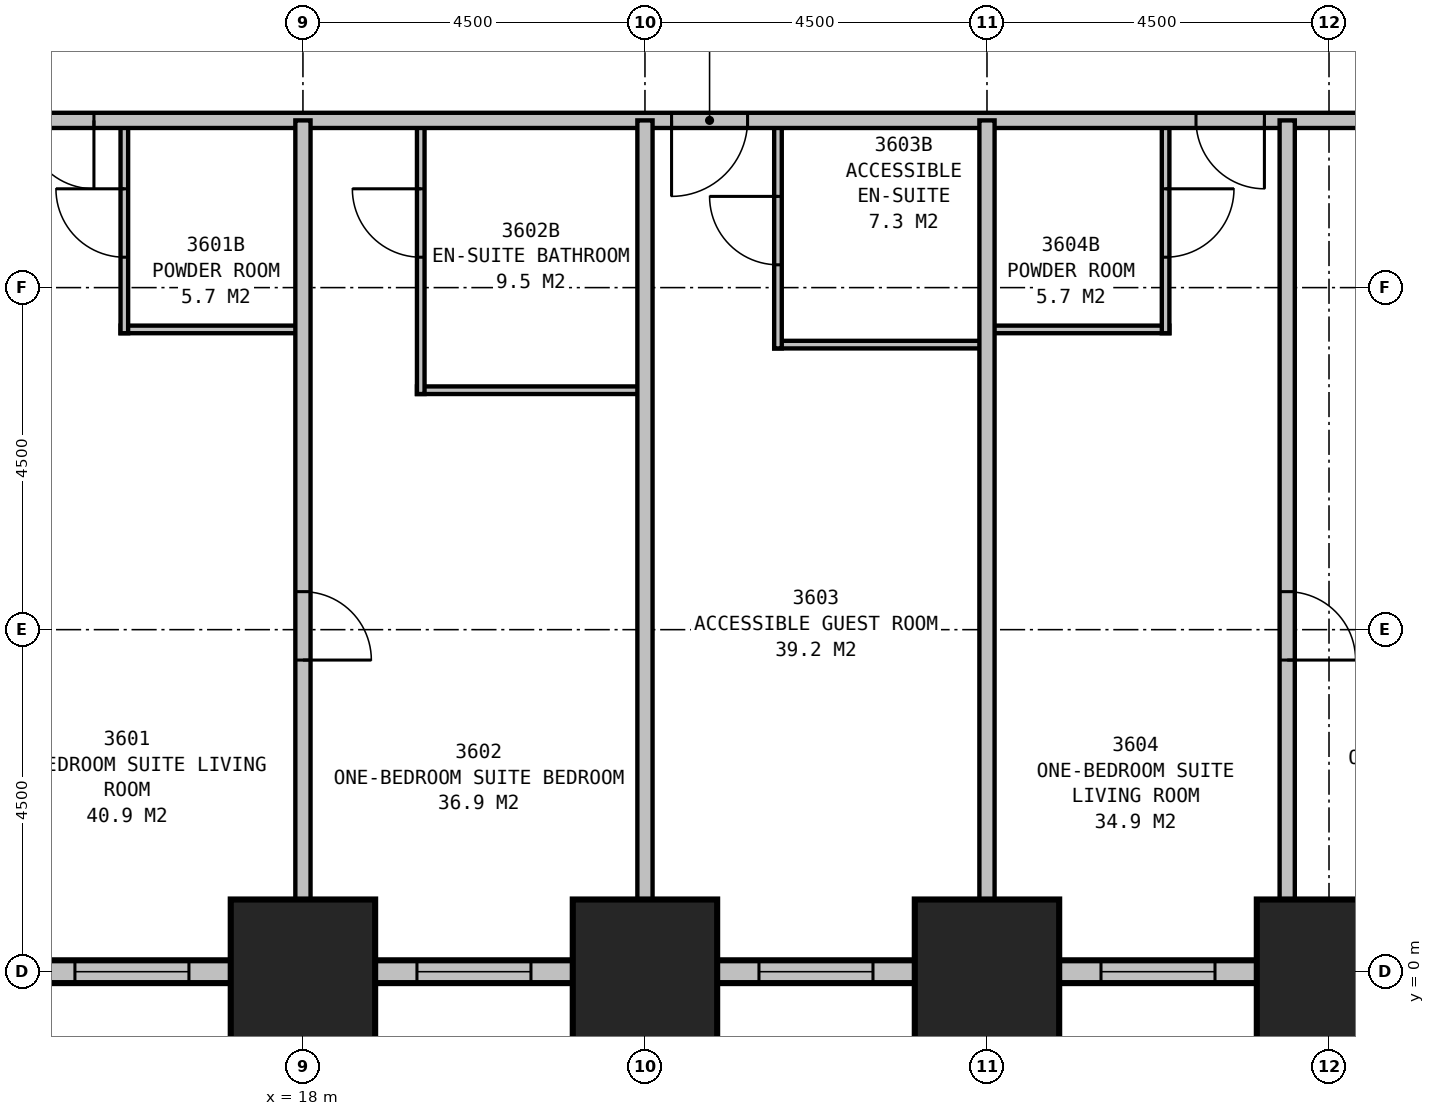
"""IFC4 building model, lengths in metres.
Left out: names, types, materials, properties, quantities, classifications, styles, units other than length and angle.
Written with IfcOpenShell. Run it as: python <this file> out.ifc"""

import sys

from ifc_helpers import new_model, si_unit, direction, frame, frame_2d, origin, origin_2d, place, context, subcontext, project, spatial, rectangle, extrude, element, fill, save


model = new_model("IFC4")
c1 = context("Model", 3, precision=1e-05, world=origin(), true_north=direction((0.0, 1.0)))
c2 = subcontext(c1, "Body", "Model", "MODEL_VIEW")
j1 = project(units=[si_unit("LENGTHUNIT", "METRE"), si_unit("PLANEANGLEUNIT", "RADIAN")], contexts=[c1])
p1 = place(None, origin())
s1 = spatial("IfcSite", under=j1, at=p1, CompositionType="ELEMENT")
p2 = place(p1, origin())
s2 = spatial("IfcBuilding", under=s1, at=p2, CompositionType="ELEMENT")
p3 = place(p2, frame((0.0, 0.0, 138.9)))
s3 = spatial("IfcBuildingStorey", under=s2, at=p3, CompositionType="ELEMENT", Elevation=138.9)
for number, where, z_axis, x_axis in (
    (1, (18.0, 0.0, 0.0), (0.0, 0.0, 1.0), (1.0, 0.0, 0.0)),
    (2, (22.5, 0.0, 0.0), (0.0, 0.0, 1.0), (1.0, 0.0, 0.0)),
    (3, (27.0, 0.0, 0.0), (0.0, 0.0, 1.0), (1.0, 0.0, 0.0)),
    (4, (31.5, 0.0, 0.0), (0.0, 0.0, 1.0), (1.0, 0.0, 0.0)),
):
    element("IfcColumn", number, at=place(p3, frame(where, z_axis=z_axis, x_axis=x_axis)), inside=s3, PredefinedType="COLUMN", context=c2, shape_type="SweptSolid", body=[
        extrude(rectangle(XDim=1.9, YDim=1.9, at=origin_2d()), origin(), (0.0, 0.0, 1.0), 3.5),
    ])
p4 = place(p3, frame((4.35, 0.0, 0.0), z_axis=(0.0, 0.0, 1.0), x_axis=(1.0, 0.0, 0.0)))
e5 = element("IfcWall", 5, at=p4, inside=s3, PredefinedType="STANDARD", context=c2, shape_type="SweptSolid", body=[
    extrude(rectangle(XDim=40.8, YDim=0.3, at=frame_2d((20.4, 0.0))), origin(), (0.0, 0.0, 1.0), 2.15),
])
p5 = place(p4, frame((1.65, 0.0, 0.5)))
e6 = element("IfcOpeningElement", 6, at=p5, cuts=e5, PredefinedType="OPENING", context=c2, shape_type="SweptSolid", body=[
    extrude(rectangle(XDim=1.5, YDim=1.5, at=frame_2d((0.75, 0.75))), frame((0.0, 0.16, 0.0), z_axis=(0.0, -1.0, 0.0), x_axis=(1.0, 0.0, 0.0)), (0.0, 0.0, 1.0), 0.32),
])
p6 = place(p4, frame((6.15, 0.0, 0.5)))
e7 = element("IfcOpeningElement", 7, at=p6, cuts=e5, PredefinedType="OPENING", context=c2, shape_type="SweptSolid", body=[
    extrude(rectangle(XDim=1.5, YDim=1.5, at=frame_2d((0.75, 0.75))), frame((0.0, 0.16, 0.0), z_axis=(0.0, -1.0, 0.0), x_axis=(1.0, 0.0, 0.0)), (0.0, 0.0, 1.0), 0.32),
])
p7 = place(p4, frame((10.65, 0.0, 0.5)))
e8 = element("IfcOpeningElement", 8, at=p7, cuts=e5, PredefinedType="OPENING", context=c2, shape_type="SweptSolid", body=[
    extrude(rectangle(XDim=1.5, YDim=1.5, at=frame_2d((0.75, 0.75))), frame((0.0, 0.16, 0.0), z_axis=(0.0, -1.0, 0.0), x_axis=(1.0, 0.0, 0.0)), (0.0, 0.0, 1.0), 0.32),
])
p8 = place(p4, frame((15.15, 0.0, 0.5)))
e9 = element("IfcOpeningElement", 9, at=p8, cuts=e5, PredefinedType="OPENING", context=c2, shape_type="SweptSolid", body=[
    extrude(rectangle(XDim=1.5, YDim=1.5, at=frame_2d((0.75, 0.75))), frame((0.0, 0.16, 0.0), z_axis=(0.0, -1.0, 0.0), x_axis=(1.0, 0.0, 0.0)), (0.0, 0.0, 1.0), 0.32),
])
p9 = place(p4, frame((19.65, 0.0, 0.5)))
e10 = element("IfcOpeningElement", 10, at=p9, cuts=e5, PredefinedType="OPENING", context=c2, shape_type="SweptSolid", body=[
    extrude(rectangle(XDim=1.5, YDim=1.5, at=frame_2d((0.75, 0.75))), frame((0.0, 0.16, 0.0), z_axis=(0.0, -1.0, 0.0), x_axis=(1.0, 0.0, 0.0)), (0.0, 0.0, 1.0), 0.32),
])
p10 = place(p4, frame((24.15, 0.0, 0.5)))
e11 = element("IfcOpeningElement", 11, at=p10, cuts=e5, PredefinedType="OPENING", context=c2, shape_type="SweptSolid", body=[
    extrude(rectangle(XDim=1.5, YDim=1.5, at=frame_2d((0.75, 0.75))), frame((0.0, 0.16, 0.0), z_axis=(0.0, -1.0, 0.0), x_axis=(1.0, 0.0, 0.0)), (0.0, 0.0, 1.0), 0.32),
])
p11 = place(p4, frame((28.65, 0.0, 0.5)))
e12 = element("IfcOpeningElement", 12, at=p11, cuts=e5, PredefinedType="OPENING", context=c2, shape_type="SweptSolid", body=[
    extrude(rectangle(XDim=1.5, YDim=1.5, at=frame_2d((0.75, 0.75))), frame((0.0, 0.16, 0.0), z_axis=(0.0, -1.0, 0.0), x_axis=(1.0, 0.0, 0.0)), (0.0, 0.0, 1.0), 0.32),
])
p12 = place(p4, frame((33.15, 0.0, 0.5)))
e13 = element("IfcOpeningElement", 13, at=p12, cuts=e5, PredefinedType="OPENING", context=c2, shape_type="SweptSolid", body=[
    extrude(rectangle(XDim=1.5, YDim=1.5, at=frame_2d((0.75, 0.75))), frame((0.0, 0.16, 0.0), z_axis=(0.0, -1.0, 0.0), x_axis=(1.0, 0.0, 0.0)), (0.0, 0.0, 1.0), 0.32),
])
p13 = place(p4, frame((37.65, 0.0, 0.5)))
e14 = element("IfcOpeningElement", 14, at=p13, cuts=e5, PredefinedType="OPENING", context=c2, shape_type="SweptSolid", body=[
    extrude(rectangle(XDim=1.5, YDim=1.5, at=frame_2d((0.75, 0.75))), frame((0.0, 0.16, 0.0), z_axis=(0.0, -1.0, 0.0), x_axis=(1.0, 0.0, 0.0)), (0.0, 0.0, 1.0), 0.32),
])
p14 = place(p3, frame((11.2, 11.2, 0.0), z_axis=(0.0, 0.0, 1.0), x_axis=(1.0, 0.0, 0.0)))
e15 = element("IfcWall", 15, at=p14, inside=s3, PredefinedType="PARTITIONING", context=c2, shape_type="SweptSolid", body=[
    extrude(rectangle(XDim=27.1, YDim=0.2, at=frame_2d((13.55, 0.0))), origin(), (0.0, 0.0, 1.0), 3.25),
])
p15 = place(p14, frame((4.05, 0.0, 0.0), z_axis=(0.0, 0.0, 1.0), x_axis=(-1.0, 0.0, 0.0)))
e16 = element("IfcOpeningElement", 16, at=p15, cuts=e15, PredefinedType="OPENING", context=c2, shape_type="SweptSolid", body=[
    extrude(rectangle(XDim=0.9, YDim=2.1, at=frame_2d((0.45, 1.05))), frame((0.0, 0.11, 0.0), z_axis=(0.0, -1.0, 0.0), x_axis=(1.0, 0.0, 0.0)), (0.0, 0.0, 1.0), 0.22),
])
p16 = place(p14, frame((12.65, 0.0, 0.0), z_axis=(0.0, 0.0, 1.0), x_axis=(-1.0, 0.0, 0.0)))
e17 = element("IfcOpeningElement", 17, at=p16, cuts=e15, PredefinedType="OPENING", context=c2, shape_type="SweptSolid", body=[
    extrude(rectangle(XDim=1.0, YDim=2.1, at=frame_2d((0.5, 1.05))), frame((0.0, 0.11, 0.0), z_axis=(0.0, -1.0, 0.0), x_axis=(1.0, 0.0, 0.0)), (0.0, 0.0, 1.0), 0.22),
])
p17 = place(p14, frame((19.45, 0.0, 0.0), z_axis=(0.0, 0.0, 1.0), x_axis=(-1.0, 0.0, 0.0)))
e18 = element("IfcOpeningElement", 18, at=p17, cuts=e15, PredefinedType="OPENING", context=c2, shape_type="SweptSolid", body=[
    extrude(rectangle(XDim=0.9, YDim=2.1, at=frame_2d((0.45, 1.05))), frame((0.0, 0.11, 0.0), z_axis=(0.0, -1.0, 0.0), x_axis=(1.0, 0.0, 0.0)), (0.0, 0.0, 1.0), 0.22),
])
p18 = place(p14, frame((1.6, 0.0, 0.0), z_axis=(0.0, 0.0, 1.0), x_axis=(-1.0, 0.0, 0.0)))
e19 = element("IfcOpeningElement", 19, at=p18, cuts=e15, PredefinedType="OPENING", context=c2, shape_type="SweptSolid", body=[
    extrude(rectangle(XDim=0.9, YDim=2.1, at=frame_2d((0.45, 1.05))), frame((0.0, 0.11, 0.0), z_axis=(0.0, -1.0, 0.0), x_axis=(1.0, 0.0, 0.0)), (0.0, 0.0, 1.0), 0.22),
])
p19 = place(p14, frame((26.4, 0.0, 0.0), z_axis=(0.0, 0.0, 1.0), x_axis=(-1.0, 0.0, 0.0)))
e20 = element("IfcOpeningElement", 20, at=p19, cuts=e15, PredefinedType="OPENING", context=c2, shape_type="SweptSolid", body=[
    extrude(rectangle(XDim=0.9, YDim=2.1, at=frame_2d((0.45, 1.05))), frame((0.0, 0.11, 0.0), z_axis=(0.0, -1.0, 0.0), x_axis=(1.0, 0.0, 0.0)), (0.0, 0.0, 1.0), 0.22),
])
p20 = place(p3, frame((18.0, 11.2, 0.0), z_axis=(0.0, 0.0, 1.0), x_axis=(0.0, -1.0, 0.0)))
e21 = element("IfcWall", 21, at=p20, inside=s3, PredefinedType="PARTITIONING", context=c2, shape_type="SweptSolid", body=[
    extrude(rectangle(XDim=11.2, YDim=0.2, at=frame_2d((5.6, 0.0))), origin(), (0.0, 0.0, 1.0), 2.25),
])
p21 = place(p20, frame((6.2, 0.0, 0.0)))
e22 = element("IfcOpeningElement", 22, at=p21, cuts=e21, PredefinedType="OPENING", context=c2, shape_type="SweptSolid", body=[
    extrude(rectangle(XDim=0.9, YDim=2.1, at=frame_2d((0.45, 1.05))), frame((0.0, 0.11, 0.0), z_axis=(0.0, -1.0, 0.0), x_axis=(1.0, 0.0, 0.0)), (0.0, 0.0, 1.0), 0.22),
])
for number, where, z_axis, x_axis in (
    (23, (22.5, 11.2, 0.0), (0.0, 0.0, 1.0), (0.0, -1.0, 0.0)),
    (24, (27.0, 11.2, 0.0), (0.0, 0.0, 1.0), (0.0, -1.0, 0.0)),
):
    element("IfcWall", number, at=place(p3, frame(where, z_axis=z_axis, x_axis=x_axis)), inside=s3, PredefinedType="PARTITIONING", context=c2, shape_type="SweptSolid", body=[
        extrude(rectangle(XDim=11.2, YDim=0.2, at=frame_2d((5.6, 0.0))), origin(), (0.0, 0.0, 1.0), 2.25),
    ])
p22 = place(p3, frame((30.95, 11.2, 0.0), z_axis=(0.0, 0.0, 1.0), x_axis=(0.0, -1.0, 0.0)))
e25 = element("IfcWall", 25, at=p22, inside=s3, PredefinedType="PARTITIONING", context=c2, shape_type="SweptSolid", body=[
    extrude(rectangle(XDim=11.2, YDim=0.2, at=frame_2d((5.6, 0.0))), origin(), (0.0, 0.0, 1.0), 2.25),
])
p23 = place(p22, frame((6.2, 0.0, 0.0)))
e26 = element("IfcOpeningElement", 26, at=p23, cuts=e25, PredefinedType="OPENING", context=c2, shape_type="SweptSolid", body=[
    extrude(rectangle(XDim=0.9, YDim=2.1, at=frame_2d((0.45, 1.05))), frame((0.0, 0.11, 0.0), z_axis=(0.0, -1.0, 0.0), x_axis=(1.0, 0.0, 0.0)), (0.0, 0.0, 1.0), 0.22),
])
p24 = place(p3, frame((15.6, 8.45, 0.0), z_axis=(0.0, 0.0, 1.0), x_axis=(1.0, 0.0, 0.0)))
e27 = element("IfcWall", 27, at=p24, inside=s3, PredefinedType="PLUMBINGWALL", context=c2, shape_type="SweptSolid", body=[
    extrude(rectangle(XDim=2.4, YDim=0.1, at=frame_2d((1.2, 0.0))), origin(), (0.0, 0.0, 1.0), 3.25),
])
p25 = place(p3, frame((15.65, 11.2, 0.0), z_axis=(0.0, 0.0, 1.0), x_axis=(0.0, -1.0, 0.0)))
e28 = element("IfcWall", 28, at=p25, inside=s3, PredefinedType="PLUMBINGWALL", context=c2, shape_type="SweptSolid", body=[
    extrude(rectangle(XDim=2.8, YDim=0.1, at=frame_2d((1.4, 0.0))), origin(), (0.0, 0.0, 1.0), 3.25),
])
p26 = place(p25, frame((1.8, 0.0, 0.0), z_axis=(0.0, 0.0, 1.0), x_axis=(-1.0, 0.0, 0.0)))
e29 = element("IfcOpeningElement", 29, at=p26, cuts=e28, PredefinedType="OPENING", context=c2, shape_type="SweptSolid", body=[
    extrude(rectangle(XDim=0.9, YDim=2.1, at=frame_2d((0.45, 1.05))), frame((0.0, 0.06, 0.0), z_axis=(0.0, -1.0, 0.0), x_axis=(1.0, 0.0, 0.0)), (0.0, 0.0, 1.0), 0.12),
])
p27 = place(p3, frame((19.5, 7.65, 0.0), z_axis=(0.0, 0.0, 1.0), x_axis=(1.0, 0.0, 0.0)))
e30 = element("IfcWall", 30, at=p27, inside=s3, PredefinedType="PLUMBINGWALL", context=c2, shape_type="SweptSolid", body=[
    extrude(rectangle(XDim=3.0, YDim=0.1, at=frame_2d((1.5, 0.0))), origin(), (0.0, 0.0, 1.0), 3.25),
])
p28 = place(p3, frame((19.55, 11.2, 0.0), z_axis=(0.0, 0.0, 1.0), x_axis=(0.0, -1.0, 0.0)))
e31 = element("IfcWall", 31, at=p28, inside=s3, PredefinedType="PLUMBINGWALL", context=c2, shape_type="SweptSolid", body=[
    extrude(rectangle(XDim=3.6, YDim=0.1, at=frame_2d((1.8, 0.0))), origin(), (0.0, 0.0, 1.0), 3.25),
])
p29 = place(p28, frame((1.8, 0.0, 0.0), z_axis=(0.0, 0.0, 1.0), x_axis=(-1.0, 0.0, 0.0)))
e32 = element("IfcOpeningElement", 32, at=p29, cuts=e31, PredefinedType="OPENING", context=c2, shape_type="SweptSolid", body=[
    extrude(rectangle(XDim=0.9, YDim=2.1, at=frame_2d((0.45, 1.05))), frame((0.0, 0.06, 0.0), z_axis=(0.0, -1.0, 0.0), x_axis=(1.0, 0.0, 0.0)), (0.0, 0.0, 1.0), 0.12),
])
p30 = place(p3, frame((24.2, 8.25, 0.0), z_axis=(0.0, 0.0, 1.0), x_axis=(1.0, 0.0, 0.0)))
e33 = element("IfcWall", 33, at=p30, inside=s3, PredefinedType="PLUMBINGWALL", context=c2, shape_type="SweptSolid", body=[
    extrude(rectangle(XDim=2.8, YDim=0.1, at=frame_2d((1.4, 0.0))), origin(), (0.0, 0.0, 1.0), 3.25),
])
p31 = place(p3, frame((24.25, 11.2, 0.0), z_axis=(0.0, 0.0, 1.0), x_axis=(0.0, -1.0, 0.0)))
e34 = element("IfcWall", 34, at=p31, inside=s3, PredefinedType="PLUMBINGWALL", context=c2, shape_type="SweptSolid", body=[
    extrude(rectangle(XDim=3.0, YDim=0.1, at=frame_2d((1.5, 0.0))), origin(), (0.0, 0.0, 1.0), 3.25),
])
p32 = place(p31, frame((1.9, 0.0, 0.0), z_axis=(0.0, 0.0, 1.0), x_axis=(-1.0, 0.0, 0.0)))
e35 = element("IfcOpeningElement", 35, at=p32, cuts=e34, PredefinedType="OPENING", context=c2, shape_type="SweptSolid", body=[
    extrude(rectangle(XDim=0.9, YDim=2.1, at=frame_2d((0.45, 1.05))), frame((0.0, 0.06, 0.0), z_axis=(0.0, -1.0, 0.0), x_axis=(1.0, 0.0, 0.0)), (0.0, 0.0, 1.0), 0.12),
])
p33 = place(p3, frame((27.0, 8.45, 0.0), z_axis=(0.0, 0.0, 1.0), x_axis=(1.0, 0.0, 0.0)))
e36 = element("IfcWall", 36, at=p33, inside=s3, PredefinedType="PLUMBINGWALL", context=c2, shape_type="SweptSolid", body=[
    extrude(rectangle(XDim=2.4, YDim=0.1, at=frame_2d((1.2, 0.0))), origin(), (0.0, 0.0, 1.0), 3.25),
])
p34 = place(p3, frame((29.35, 11.2, 0.0), z_axis=(0.0, 0.0, 1.0), x_axis=(0.0, -1.0, 0.0)))
e37 = element("IfcWall", 37, at=p34, inside=s3, PredefinedType="PLUMBINGWALL", context=c2, shape_type="SweptSolid", body=[
    extrude(rectangle(XDim=2.8, YDim=0.1, at=frame_2d((1.4, 0.0))), origin(), (0.0, 0.0, 1.0), 3.25),
])
p35 = place(p34, frame((0.9, 0.0, 0.0)))
e38 = element("IfcOpeningElement", 38, at=p35, cuts=e37, PredefinedType="OPENING", context=c2, shape_type="SweptSolid", body=[
    extrude(rectangle(XDim=0.9, YDim=2.1, at=frame_2d((0.45, 1.05))), frame((0.0, 0.06, 0.0), z_axis=(0.0, -1.0, 0.0), x_axis=(1.0, 0.0, 0.0)), (0.0, 0.0, 1.0), 0.12),
])
p36 = place(p7, origin())
e39 = element("IfcWindow", 39, at=p36, inside=s3, PartitioningType="SINGLE_PANEL", PredefinedType="WINDOW", context=c2, shape_type="SweptSolid", body=[
    extrude(rectangle(XDim=1.5, YDim=1.5, at=frame_2d((0.75, 0.75))), frame((0.0, 0.03, 0.0), z_axis=(0.0, -1.0, 0.0), x_axis=(1.0, 0.0, 0.0)), (0.0, 0.0, 1.0), 0.06),
])
fill(e8, e39)
p37 = place(p8, origin())
e40 = element("IfcWindow", 40, at=p37, inside=s3, PartitioningType="SINGLE_PANEL", PredefinedType="WINDOW", context=c2, shape_type="SweptSolid", body=[
    extrude(rectangle(XDim=1.5, YDim=1.5, at=frame_2d((0.75, 0.75))), frame((0.0, 0.03, 0.0), z_axis=(0.0, -1.0, 0.0), x_axis=(1.0, 0.0, 0.0)), (0.0, 0.0, 1.0), 0.06),
])
fill(e9, e40)
p38 = place(p9, origin())
e41 = element("IfcWindow", 41, at=p38, inside=s3, PartitioningType="SINGLE_PANEL", PredefinedType="WINDOW", context=c2, shape_type="SweptSolid", body=[
    extrude(rectangle(XDim=1.5, YDim=1.5, at=frame_2d((0.75, 0.75))), frame((0.0, 0.03, 0.0), z_axis=(0.0, -1.0, 0.0), x_axis=(1.0, 0.0, 0.0)), (0.0, 0.0, 1.0), 0.06),
])
fill(e10, e41)
p39 = place(p10, origin())
e42 = element("IfcWindow", 42, at=p39, inside=s3, PartitioningType="SINGLE_PANEL", PredefinedType="WINDOW", context=c2, shape_type="SweptSolid", body=[
    extrude(rectangle(XDim=1.5, YDim=1.5, at=frame_2d((0.75, 0.75))), frame((0.0, 0.03, 0.0), z_axis=(0.0, -1.0, 0.0), x_axis=(1.0, 0.0, 0.0)), (0.0, 0.0, 1.0), 0.06),
])
fill(e11, e42)
p40 = place(p15, origin())
e43 = element("IfcDoor", 43, at=p40, inside=s3, OperationType="SINGLE_SWING_LEFT", PredefinedType="DOOR", context=c2, shape_type="SweptSolid", body=[
    extrude(rectangle(XDim=0.9, YDim=2.1, at=frame_2d((0.45, 1.05))), frame((0.0, 0.025, 0.0), z_axis=(0.0, -1.0, 0.0), x_axis=(1.0, 0.0, 0.0)), (0.0, 0.0, 1.0), 0.05),
])
fill(e16, e43)
p41 = place(p16, origin())
e44 = element("IfcDoor", 44, at=p41, inside=s3, OperationType="SINGLE_SWING_RIGHT", PredefinedType="DOOR", context=c2, shape_type="SweptSolid", body=[
    extrude(rectangle(XDim=1.0, YDim=2.1, at=frame_2d((0.5, 1.05))), frame((0.0, 0.025, 0.0), z_axis=(0.0, -1.0, 0.0), x_axis=(1.0, 0.0, 0.0)), (0.0, 0.0, 1.0), 0.05),
])
fill(e17, e44)
p42 = place(p17, origin())
e45 = element("IfcDoor", 45, at=p42, inside=s3, OperationType="SINGLE_SWING_LEFT", PredefinedType="DOOR", context=c2, shape_type="SweptSolid", body=[
    extrude(rectangle(XDim=0.9, YDim=2.1, at=frame_2d((0.45, 1.05))), frame((0.0, 0.025, 0.0), z_axis=(0.0, -1.0, 0.0), x_axis=(1.0, 0.0, 0.0)), (0.0, 0.0, 1.0), 0.05),
])
fill(e18, e45)
p43 = place(p21, origin())
e46 = element("IfcDoor", 46, at=p43, inside=s3, OperationType="SINGLE_SWING_RIGHT", PredefinedType="DOOR", context=c2, shape_type="SweptSolid", body=[
    extrude(rectangle(XDim=0.9, YDim=2.1, at=frame_2d((0.45, 1.05))), frame((0.0, 0.025, 0.0), z_axis=(0.0, -1.0, 0.0), x_axis=(1.0, 0.0, 0.0)), (0.0, 0.0, 1.0), 0.05),
])
fill(e22, e46)
p44 = place(p23, origin())
e47 = element("IfcDoor", 47, at=p44, inside=s3, OperationType="SINGLE_SWING_RIGHT", PredefinedType="DOOR", context=c2, shape_type="SweptSolid", body=[
    extrude(rectangle(XDim=0.9, YDim=2.1, at=frame_2d((0.45, 1.05))), frame((0.0, 0.025, 0.0), z_axis=(0.0, -1.0, 0.0), x_axis=(1.0, 0.0, 0.0)), (0.0, 0.0, 1.0), 0.05),
])
fill(e26, e47)
p45 = place(p26, origin())
e48 = element("IfcDoor", 48, at=p45, inside=s3, OperationType="SINGLE_SWING_RIGHT", PredefinedType="DOOR", context=c2, shape_type="SweptSolid", body=[
    extrude(rectangle(XDim=0.9, YDim=2.1, at=frame_2d((0.45, 1.05))), frame((0.0, 0.025, 0.0), z_axis=(0.0, -1.0, 0.0), x_axis=(1.0, 0.0, 0.0)), (0.0, 0.0, 1.0), 0.05),
])
fill(e29, e48)
p46 = place(p29, origin())
e49 = element("IfcDoor", 49, at=p46, inside=s3, OperationType="SINGLE_SWING_RIGHT", PredefinedType="DOOR", context=c2, shape_type="SweptSolid", body=[
    extrude(rectangle(XDim=0.9, YDim=2.1, at=frame_2d((0.45, 1.05))), frame((0.0, 0.025, 0.0), z_axis=(0.0, -1.0, 0.0), x_axis=(1.0, 0.0, 0.0)), (0.0, 0.0, 1.0), 0.05),
])
fill(e32, e49)
p47 = place(p32, origin())
e50 = element("IfcDoor", 50, at=p47, inside=s3, OperationType="SINGLE_SWING_RIGHT", PredefinedType="DOOR", context=c2, shape_type="SweptSolid", body=[
    extrude(rectangle(XDim=0.9, YDim=2.1, at=frame_2d((0.45, 1.05))), frame((0.0, 0.025, 0.0), z_axis=(0.0, -1.0, 0.0), x_axis=(1.0, 0.0, 0.0)), (0.0, 0.0, 1.0), 0.05),
])
fill(e35, e50)
p48 = place(p35, origin())
e51 = element("IfcDoor", 51, at=p48, inside=s3, OperationType="SINGLE_SWING_LEFT", PredefinedType="DOOR", context=c2, shape_type="SweptSolid", body=[
    extrude(rectangle(XDim=0.9, YDim=2.1, at=frame_2d((0.45, 1.05))), frame((0.0, 0.025, 0.0), z_axis=(0.0, -1.0, 0.0), x_axis=(1.0, 0.0, 0.0)), (0.0, 0.0, 1.0), 0.05),
])
fill(e38, e51)
save(model, sys.argv[1])
